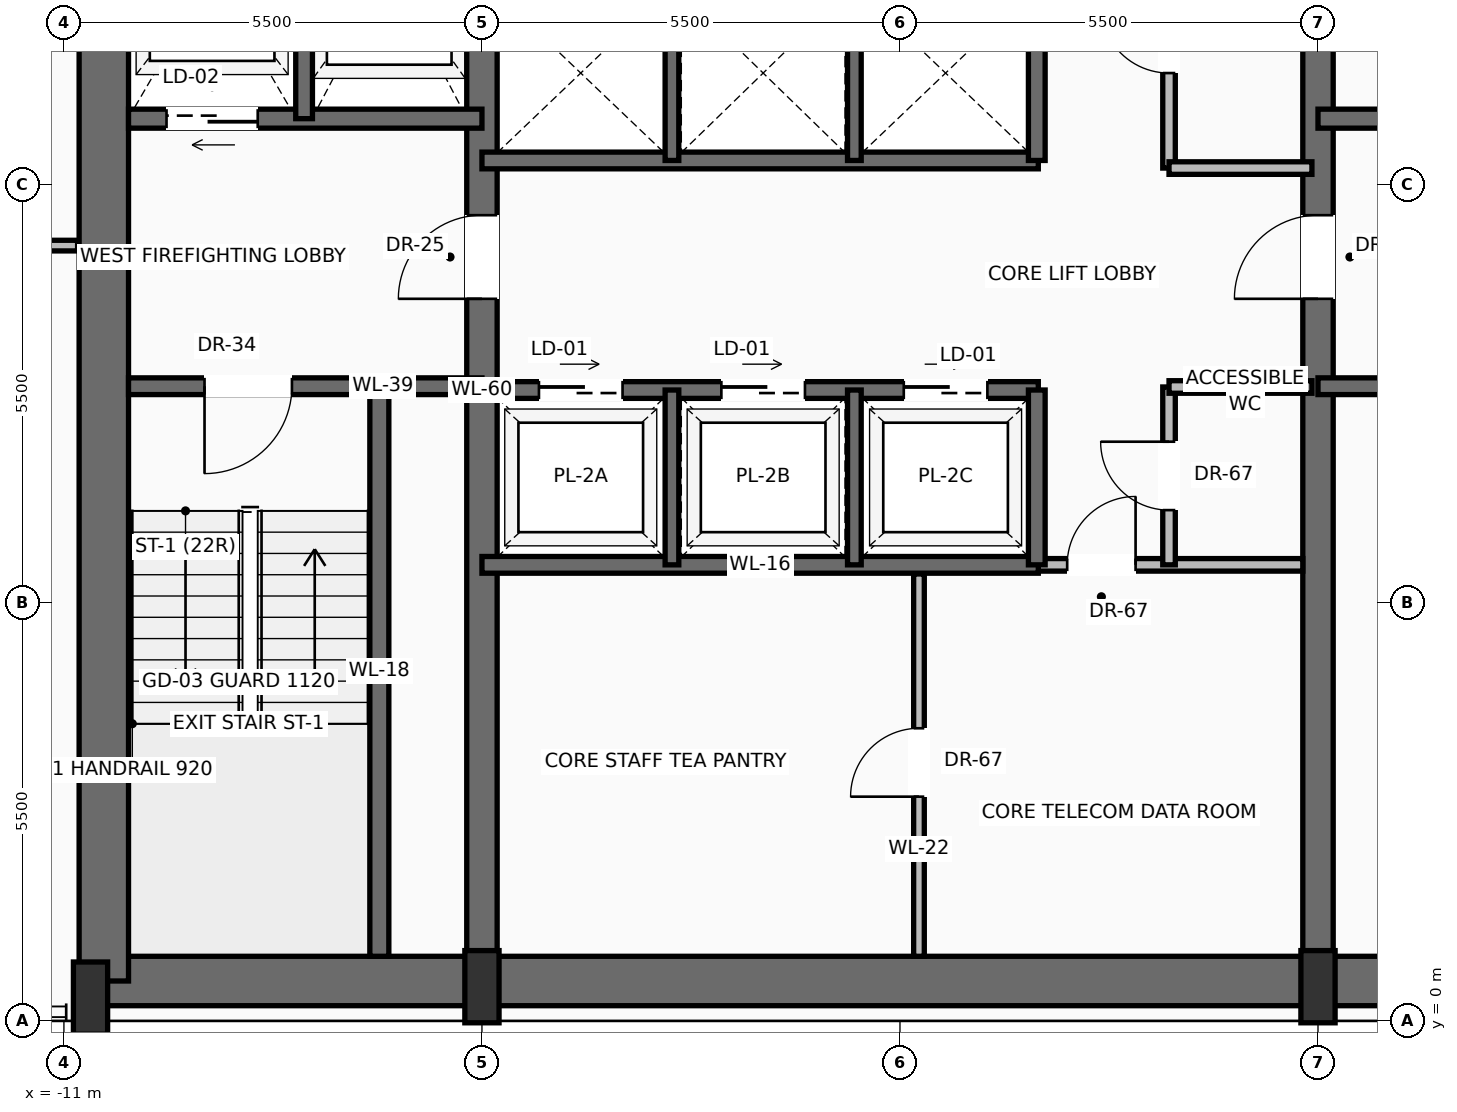
"""IFC4 building model, lengths in metres.
Left out: names, types, materials, properties, quantities, classifications, styles, units other than length and angle.
Written with IfcOpenShell. Run it as: python <this file> out.ifc"""

import sys

from ifc_helpers import new_model, si_unit, direction, frame, frame_2d, origin, origin_2d, place, context, subcontext, project, spatial, rectangle, extrude, source, transform, mapped, element, fill, save


model = new_model("IFC4")
c1 = context("Model", 3, precision=1e-05, world=origin(), true_north=direction((0.0, 1.0)))
c2 = subcontext(c1, "Body", "Model", "MODEL_VIEW")
j1 = project(units=[si_unit("LENGTHUNIT", "METRE"), si_unit("PLANEANGLEUNIT", "RADIAN")], contexts=[c1])
p1 = place(None, origin())
s1 = spatial("IfcSite", under=j1, at=p1, CompositionType="ELEMENT")
p2 = place(p1, origin())
s2 = spatial("IfcBuilding", under=s1, at=p2, CompositionType="ELEMENT")
p3 = place(p2, frame((0.0, 0.0, 200.6)))
s3 = spatial("IfcBuildingStorey", under=s2, at=p3, CompositionType="ELEMENT", Elevation=200.6)
p4 = place(p3, frame((-10.65, 0.525, 0.0), z_axis=(0.0, 0.0, 1.0), x_axis=(1.0, 0.0, 0.0)))
e1 = element("IfcWall", 1, at=p4, inside=s3, PredefinedType="SHEAR", context=c2, shape_type="SweptSolid", body=[
    extrude(rectangle(XDim=21.3, YDim=0.65, at=frame_2d((10.65, 0.0))), origin(), (0.0, 0.0, 1.0), 3.47),
])
p5 = place(p3, frame((-10.475, 0.525, 0.0), z_axis=(0.0, 0.0, 1.0), x_axis=(0.0, 1.0, 0.0)))
e2 = element("IfcWall", 2, at=p5, inside=s3, PredefinedType="SHEAR", context=c2, shape_type="SweptSolid", body=[
    extrude(rectangle(XDim=15.55, YDim=0.65, at=frame_2d((7.775, 0.0))), origin(), (0.0, 0.0, 1.0), 3.47),
])
p6 = place(p3, frame((-5.5, 0.525, 0.0), z_axis=(0.0, 0.0, 1.0), x_axis=(0.0, 1.0, 0.0)))
e3 = element("IfcWall", 3, at=p6, inside=s3, PredefinedType="SHEAR", context=c2, shape_type="SweptSolid", body=[
    extrude(rectangle(XDim=15.55, YDim=0.4, at=frame_2d((7.775, 0.0))), origin(), (0.0, 0.0, 1.0), 3.47),
])
p7 = place(p6, frame((8.975, 0.0, 0.0)))
e4 = element("IfcOpeningElement", 4, at=p7, cuts=e3, PredefinedType="OPENING", context=c2, shape_type="SweptSolid", body=[
    extrude(rectangle(XDim=1.1, YDim=2.2, at=frame_2d((0.55, 1.1))), frame((0.0, 0.21, 0.0), z_axis=(0.0, -1.0, 0.0), x_axis=(1.0, 0.0, 0.0)), (0.0, 0.0, 1.0), 0.42),
])
p8 = place(p3, frame((5.5, 0.525, 0.0), z_axis=(0.0, 0.0, 1.0), x_axis=(0.0, 1.0, 0.0)))
e5 = element("IfcWall", 5, at=p8, inside=s3, PredefinedType="SHEAR", context=c2, shape_type="SweptSolid", body=[
    extrude(rectangle(XDim=15.55, YDim=0.4, at=frame_2d((7.775, 0.0))), origin(), (0.0, 0.0, 1.0), 3.47),
])
p9 = place(p8, frame((8.975, 0.0, 0.0)))
e6 = element("IfcOpeningElement", 6, at=p9, cuts=e5, PredefinedType="OPENING", context=c2, shape_type="SweptSolid", body=[
    extrude(rectangle(XDim=1.1, YDim=2.2, at=frame_2d((0.55, 1.1))), frame((0.0, 0.21, 0.0), z_axis=(0.0, -1.0, 0.0), x_axis=(1.0, 0.0, 0.0)), (0.0, 0.0, 1.0), 0.42),
])
m1 = source(origin(), c2, "Body", "SweptSolid", [
    extrude(rectangle(XDim=0.45, YDim=0.95, at=origin_2d()), origin(), (0.0, 0.0, 1.0), 3.7),
])
for number, where, z_axis, x_axis in (
    (7, (-10.65, 0.3, 0.0), (0.0, 0.0, 1.0), (1.0, 0.0, 0.0)),
    (8, (-5.5, 0.45, 0.0), (0.0, 0.0, 1.0), (1.0, 0.0, 0.0)),
    (9, (5.5, 0.45, 0.0), (0.0, 0.0, 1.0), (1.0, 0.0, 0.0)),
):
    element("IfcColumn", number, at=place(p3, frame(where, z_axis=z_axis, x_axis=x_axis)), inside=s3, PredefinedType="PILASTER", context=c2, shape_type="MappedRepresentation", body=[
        mapped(m1, transform((0.0, 0.0, 0.0), scale=1.0)),
    ])
p10 = place(p3, frame((-6.85, 0.85, 0.0), z_axis=(0.0, 0.0, 1.0), x_axis=(0.0, 1.0, 0.0)))
e10 = element("IfcWall", 10, at=p10, inside=s3, PredefinedType="SOLIDWALL", context=c2, shape_type="SweptSolid", body=[
    extrude(rectangle(XDim=7.5, YDim=0.25, at=frame_2d((3.75, 0.0))), origin(), (0.0, 0.0, 1.0), 3.47),
])
p11 = place(p3, frame((-5.5, 8.35, 0.0), z_axis=(0.0, 0.0, 1.0), x_axis=(-1.0, 0.0, 0.0)))
e11 = element("IfcWall", 11, at=p11, inside=s3, PredefinedType="SOLIDWALL", context=c2, shape_type="SweptSolid", body=[
    extrude(rectangle(XDim=4.65, YDim=0.22, at=frame_2d((2.325, 0.0))), origin(), (0.0, 0.0, 1.0), 3.47),
])
p12 = place(p11, frame((2.5, 0.0, 0.0)))
e12 = element("IfcOpeningElement", 12, at=p12, cuts=e11, PredefinedType="OPENING", context=c2, shape_type="SweptSolid", body=[
    extrude(rectangle(XDim=1.15, YDim=2.2, at=frame_2d((0.575, 1.1))), frame((0.0, 0.12, 0.0), z_axis=(0.0, -1.0, 0.0), x_axis=(1.0, 0.0, 0.0)), (0.0, 0.0, 1.0), 0.24),
])
p13 = place(p3, frame((-5.5, 11.87, 0.0), z_axis=(0.0, 0.0, 1.0), x_axis=(-1.0, 0.0, 0.0)))
e13 = element("IfcWall", 13, at=p13, inside=s3, PredefinedType="SOLIDWALL", context=c2, shape_type="SweptSolid", body=[
    extrude(rectangle(XDim=4.65, YDim=0.25, at=frame_2d((2.325, 0.0))), origin(), (0.0, 0.0, 1.0), 3.47),
])
p14 = place(p13, frame((2.95, 0.0, 0.0)))
e14 = element("IfcOpeningElement", 14, at=p14, cuts=e13, PredefinedType="OPENING", context=c2, shape_type="SweptSolid", body=[
    extrude(rectangle(XDim=1.2, YDim=2.25, at=frame_2d((0.6, 1.125))), frame((0.0, 0.135, 0.0), z_axis=(0.0, -1.0, 0.0), x_axis=(1.0, 0.0, 0.0)), (0.0, 0.0, 1.0), 0.27),
])
p15 = place(p3, frame((-7.84, 11.87, 0.0), z_axis=(0.0, 0.0, 1.0), x_axis=(0.0, 1.0, 0.0)))
e15 = element("IfcWall", 15, at=p15, inside=s3, PredefinedType="SOLIDWALL", context=c2, shape_type="SweptSolid", body=[
    extrude(rectangle(XDim=3.88, YDim=0.22, at=frame_2d((1.94, 0.0))), origin(), (0.0, 0.0, 1.0), 3.47),
])
p16 = place(p3, frame((10.15, 8.35, 0.0), z_axis=(0.0, 0.0, 1.0), x_axis=(-1.0, 0.0, 0.0)))
e16 = element("IfcWall", 16, at=p16, inside=s3, PredefinedType="SOLIDWALL", context=c2, shape_type="SweptSolid", body=[
    extrude(rectangle(XDim=4.65, YDim=0.22, at=frame_2d((2.325, 0.0))), origin(), (0.0, 0.0, 1.0), 3.47),
])
p17 = place(p16, frame((1.0, 0.0, 0.0)))
e17 = element("IfcOpeningElement", 17, at=p17, cuts=e16, PredefinedType="OPENING", context=c2, shape_type="SweptSolid", body=[
    extrude(rectangle(XDim=1.15, YDim=2.2, at=frame_2d((0.575, 1.1))), frame((0.0, 0.12, 0.0), z_axis=(0.0, -1.0, 0.0), x_axis=(1.0, 0.0, 0.0)), (0.0, 0.0, 1.0), 0.24),
])
p18 = place(p3, frame((10.15, 11.87, 0.0), z_axis=(0.0, 0.0, 1.0), x_axis=(-1.0, 0.0, 0.0)))
e18 = element("IfcWall", 18, at=p18, inside=s3, PredefinedType="SOLIDWALL", context=c2, shape_type="SweptSolid", body=[
    extrude(rectangle(XDim=4.65, YDim=0.25, at=frame_2d((2.325, 0.0))), origin(), (0.0, 0.0, 1.0), 3.47),
])
p19 = place(p18, frame((0.5, 0.0, 0.0)))
e19 = element("IfcOpeningElement", 19, at=p19, cuts=e18, PredefinedType="OPENING", context=c2, shape_type="SweptSolid", body=[
    extrude(rectangle(XDim=1.2, YDim=2.25, at=frame_2d((0.6, 1.125))), frame((0.0, 0.135, 0.0), z_axis=(0.0, -1.0, 0.0), x_axis=(1.0, 0.0, 0.0)), (0.0, 0.0, 1.0), 0.27),
])
p20 = place(p3, frame((1.82, 6.0, 0.0), z_axis=(0.0, 0.0, 1.0), x_axis=(1.0, 0.0, 0.0)))
e20 = element("IfcWall", 20, at=p20, inside=s3, PredefinedType="PARTITIONING", context=c2, shape_type="SweptSolid", body=[
    extrude(rectangle(XDim=3.48, YDim=0.165, at=frame_2d((1.74, 0.0))), origin(), (0.0, 0.0, 1.0), 3.462),
])
p21 = place(p20, frame((0.38, 0.0, 0.0)))
e21 = element("IfcOpeningElement", 21, at=p21, cuts=e20, PredefinedType="OPENING", context=c2, shape_type="SweptSolid", body=[
    extrude(rectangle(XDim=0.9, YDim=2.1, at=frame_2d((0.45, 1.05))), frame((0.0, 0.093, 0.0), z_axis=(0.0, -1.0, 0.0), x_axis=(1.0, 0.0, 0.0)), (0.0, 0.0, 1.0), 0.185),
])
p22 = place(p3, frame((0.25, 0.85, 0.0), z_axis=(0.0, 0.0, 1.0), x_axis=(0.0, 1.0, 0.0)))
e22 = element("IfcWall", 22, at=p22, inside=s3, PredefinedType="PARTITIONING", context=c2, shape_type="SweptSolid", body=[
    extrude(rectangle(XDim=5.03, YDim=0.14, at=frame_2d((2.515, 0.0))), origin(), (0.0, 0.0, 1.0), 3.462),
])
p23 = place(p22, frame((2.1, 0.0, 0.0)))
e23 = element("IfcOpeningElement", 23, at=p23, cuts=e22, PredefinedType="OPENING", context=c2, shape_type="SweptSolid", body=[
    extrude(rectangle(XDim=0.9, YDim=2.1, at=frame_2d((0.45, 1.05))), frame((0.0, 0.08, 0.0), z_axis=(0.0, -1.0, 0.0), x_axis=(1.0, 0.0, 0.0)), (0.0, 0.0, 1.0), 0.16),
])
p24 = place(p3, frame((3.54, 6.0, 0.0), z_axis=(0.0, 0.0, 1.0), x_axis=(0.0, 1.0, 0.0)))
e24 = element("IfcWall", 24, at=p24, inside=s3, PredefinedType="PARTITIONING", context=c2, shape_type="SweptSolid", body=[
    extrude(rectangle(XDim=2.34, YDim=0.165, at=frame_2d((1.17, 0.0))), origin(), (0.0, 0.0, 1.0), 3.462),
])
p25 = place(p24, frame((0.72, 0.0, 0.0)))
e25 = element("IfcOpeningElement", 25, at=p25, cuts=e24, PredefinedType="OPENING", context=c2, shape_type="SweptSolid", body=[
    extrude(rectangle(XDim=0.9, YDim=2.1, at=frame_2d((0.45, 1.05))), frame((0.0, 0.093, 0.0), z_axis=(0.0, -1.0, 0.0), x_axis=(1.0, 0.0, 0.0)), (0.0, 0.0, 1.0), 0.185),
])
p26 = place(p3, frame((3.54, 8.34, 0.0), z_axis=(0.0, 0.0, 1.0), x_axis=(1.0, 0.0, 0.0)))
e26 = element("IfcWall", 26, at=p26, inside=s3, PredefinedType="PARTITIONING", context=c2, shape_type="SweptSolid", body=[
    extrude(rectangle(XDim=1.88, YDim=0.165, at=frame_2d((0.94, 0.0))), origin(), (0.0, 0.0, 1.0), 3.462),
])
p27 = place(p3, frame((-5.5, 6.0, 0.0), z_axis=(0.0, 0.0, 1.0), x_axis=(1.0, 0.0, 0.0)))
e27 = element("IfcWall", 27, at=p27, inside=s3, PredefinedType="SOLIDWALL", context=c2, shape_type="SweptSolid", body=[
    extrude(rectangle(XDim=7.32, YDim=0.22, at=frame_2d((3.66, 0.0))), origin(), (0.0, 0.0, 1.0), 3.47),
])
p28 = place(p3, frame((-5.5, 8.3, 0.0), z_axis=(0.0, 0.0, 1.0), x_axis=(1.0, 0.0, 0.0)))
e28 = element("IfcWall", 28, at=p28, inside=s3, PredefinedType="SOLIDWALL", context=c2, shape_type="SweptSolid", body=[
    extrude(rectangle(XDim=7.32, YDim=0.22, at=frame_2d((3.66, 0.0))), origin(), (0.0, 0.0, 1.0), 3.47),
])
p29 = place(p28, frame((0.75, 0.0, 0.0)))
e29 = element("IfcOpeningElement", 29, at=p29, cuts=e28, PredefinedType="OPENING", context=c2, shape_type="SweptSolid", body=[
    extrude(rectangle(XDim=1.1, YDim=2.2, at=frame_2d((0.55, 1.1))), frame((0.0, 0.12, 0.0), z_axis=(0.0, -1.0, 0.0), x_axis=(1.0, 0.0, 0.0)), (0.0, 0.0, 1.0), 0.24),
])
p30 = place(p28, frame((3.15, 0.0, 0.0)))
e30 = element("IfcOpeningElement", 30, at=p30, cuts=e28, PredefinedType="OPENING", context=c2, shape_type="SweptSolid", body=[
    extrude(rectangle(XDim=1.1, YDim=2.2, at=frame_2d((0.55, 1.1))), frame((0.0, 0.12, 0.0), z_axis=(0.0, -1.0, 0.0), x_axis=(1.0, 0.0, 0.0)), (0.0, 0.0, 1.0), 0.24),
])
p31 = place(p28, frame((5.55, 0.0, 0.0)))
e31 = element("IfcOpeningElement", 31, at=p31, cuts=e28, PredefinedType="OPENING", context=c2, shape_type="SweptSolid", body=[
    extrude(rectangle(XDim=1.1, YDim=2.2, at=frame_2d((0.55, 1.1))), frame((0.0, 0.12, 0.0), z_axis=(0.0, -1.0, 0.0), x_axis=(1.0, 0.0, 0.0)), (0.0, 0.0, 1.0), 0.24),
])
p32 = place(p3, frame((1.8, 6.0, 0.0), z_axis=(0.0, 0.0, 1.0), x_axis=(0.0, 1.0, 0.0)))
e32 = element("IfcWall", 32, at=p32, inside=s3, PredefinedType="SOLIDWALL", context=c2, shape_type="SweptSolid", body=[
    extrude(rectangle(XDim=2.3, YDim=0.22, at=frame_2d((1.15, 0.0))), origin(), (0.0, 0.0, 1.0), 3.47),
])
for number, where, z_axis, x_axis in (
    (33, (-3.0, 6.0, 0.0), (0.0, 0.0, 1.0), (0.0, 1.0, 0.0)),
    (34, (-0.6, 6.0, 0.0), (0.0, 0.0, 1.0), (0.0, 1.0, 0.0)),
):
    element("IfcWall", number, at=place(p3, frame(where, z_axis=z_axis, x_axis=x_axis)), inside=s3, PredefinedType="SOLIDWALL", context=c2, shape_type="SweptSolid", body=[
        extrude(rectangle(XDim=2.3, YDim=0.18, at=frame_2d((1.15, 0.0))), origin(), (0.0, 0.0, 1.0), 3.47),
    ])
p33 = place(p3, frame((-5.5, 11.32, 0.0), z_axis=(0.0, 0.0, 1.0), x_axis=(1.0, 0.0, 0.0)))
e35 = element("IfcWall", 35, at=p33, inside=s3, PredefinedType="SOLIDWALL", context=c2, shape_type="SweptSolid", body=[
    extrude(rectangle(XDim=7.32, YDim=0.22, at=frame_2d((3.66, 0.0))), origin(), (0.0, 0.0, 1.0), 3.47),
])
p34 = place(p3, frame((1.8, 11.32, 0.0), z_axis=(0.0, 0.0, 1.0), x_axis=(0.0, 1.0, 0.0)))
e36 = element("IfcWall", 36, at=p34, inside=s3, PredefinedType="SOLIDWALL", context=c2, shape_type="SweptSolid", body=[
    extrude(rectangle(XDim=2.3, YDim=0.22, at=frame_2d((1.15, 0.0))), origin(), (0.0, 0.0, 1.0), 3.47),
])
for number, where, z_axis, x_axis in (
    (37, (-3.0, 11.32, 0.0), (0.0, 0.0, 1.0), (0.0, 1.0, 0.0)),
    (38, (-0.6, 11.32, 0.0), (0.0, 0.0, 1.0), (0.0, 1.0, 0.0)),
):
    element("IfcWall", number, at=place(p3, frame(where, z_axis=z_axis, x_axis=x_axis)), inside=s3, PredefinedType="SOLIDWALL", context=c2, shape_type="SweptSolid", body=[
        extrude(rectangle(XDim=2.3, YDim=0.18, at=frame_2d((1.15, 0.0))), origin(), (0.0, 0.0, 1.0), 3.47),
    ])
p35 = place(p3, frame((3.54, 11.22, 0.0), z_axis=(0.0, 0.0, 1.0), x_axis=(0.0, 1.0, 0.0)))
e39 = element("IfcWall", 39, at=p35, inside=s3, PredefinedType="PARTITIONING", context=c2, shape_type="SweptSolid", body=[
    extrude(rectangle(XDim=4.53, YDim=0.165, at=frame_2d((2.265, 0.0))), origin(), (0.0, 0.0, 1.0), 3.462),
])
p36 = place(p35, frame((1.25, 0.0, 0.0)))
e40 = element("IfcOpeningElement", 40, at=p36, cuts=e39, PredefinedType="OPENING", context=c2, shape_type="SweptSolid", body=[
    extrude(rectangle(XDim=0.9, YDim=2.1, at=frame_2d((0.45, 1.05))), frame((0.0, 0.093, 0.0), z_axis=(0.0, -1.0, 0.0), x_axis=(1.0, 0.0, 0.0)), (0.0, 0.0, 1.0), 0.185),
])
p37 = place(p3, frame((3.54, 11.22, 0.0), z_axis=(0.0, 0.0, 1.0), x_axis=(1.0, 0.0, 0.0)))
e41 = element("IfcWall", 41, at=p37, inside=s3, PredefinedType="PARTITIONING", context=c2, shape_type="SweptSolid", body=[
    extrude(rectangle(XDim=1.88, YDim=0.165, at=frame_2d((0.94, 0.0))), origin(), (0.0, 0.0, 1.0), 3.462),
])
p38 = place(p3, frame((-23.851, 10.2, 0.0), z_axis=(0.0, 0.0, 1.0), x_axis=(1.0, 0.0, 0.0)))
e42 = element("IfcWall", 42, at=p38, inside=s3, PredefinedType="PARTITIONING", context=c2, shape_type="SweptSolid", body=[
    extrude(rectangle(XDim=13.031, YDim=0.14, at=frame_2d((6.516, 0.0))), origin(), (0.0, 0.0, 1.0), 3.462),
])
p39 = place(p38, frame((6.046, 0.0, 0.0)))
e43 = element("IfcOpeningElement", 43, at=p39, cuts=e42, PredefinedType="OPENING", context=c2, shape_type="SweptSolid", body=[
    extrude(rectangle(XDim=0.95, YDim=2.2, at=frame_2d((0.475, 1.1))), frame((0.0, 0.08, 0.0), z_axis=(0.0, -1.0, 0.0), x_axis=(1.0, 0.0, 0.0)), (0.0, 0.0, 1.0), 0.16),
])
m2 = source(origin(), c2, "Body", "SweptSolid", [
    extrude(rectangle(XDim=1.15, YDim=2.2, at=frame_2d((0.575, 1.1))), frame((0.0, 0.025, 0.0), z_axis=(0.0, -1.0, 0.0), x_axis=(1.0, 0.0, 0.0)), (0.0, 0.0, 1.0), 0.05),
])
p40 = place(p12, origin())
e44 = element("IfcDoor", 44, at=p40, inside=s3, OperationType="SINGLE_SWING_RIGHT", PredefinedType="DOOR", context=c2, shape_type="MappedRepresentation", body=[
    mapped(m2, transform((0.0, 0.0, 0.0), scale=1.0)),
])
fill(e12, e44)
m3 = source(origin(), c2, "Body", "SweptSolid", [
    extrude(rectangle(XDim=1.1, YDim=2.2, at=frame_2d((0.55, 1.1))), frame((0.0, 0.025, 0.0), z_axis=(0.0, -1.0, 0.0), x_axis=(1.0, 0.0, 0.0)), (0.0, 0.0, 1.0), 0.05),
])
p41 = place(p7, origin())
e45 = element("IfcDoor", 45, at=p41, inside=s3, OperationType="SINGLE_SWING_LEFT", PredefinedType="DOOR", context=c2, shape_type="MappedRepresentation", body=[
    mapped(m3, transform((0.0, 0.0, 0.0), scale=1.0)),
])
fill(e4, e45)
m4 = source(origin(), c2, "Body", "SweptSolid", [
    extrude(rectangle(XDim=1.2, YDim=2.25, at=frame_2d((0.6, 1.125))), frame((0.0, 0.025, 0.0), z_axis=(0.0, -1.0, 0.0), x_axis=(1.0, 0.0, 0.0)), (0.0, 0.0, 1.0), 0.05),
])
p42 = place(p14, origin())
e46 = element("IfcDoor", 46, at=p42, inside=s3, OperationType="SLIDING_TO_LEFT", PredefinedType="DOOR", context=c2, shape_type="MappedRepresentation", body=[
    mapped(m4, transform((0.0, 0.0, 0.0), scale=1.0)),
])
fill(e14, e46)
p43 = place(p9, origin())
e47 = element("IfcDoor", 47, at=p43, inside=s3, OperationType="SINGLE_SWING_LEFT", PredefinedType="DOOR", context=c2, shape_type="MappedRepresentation", body=[
    mapped(m3, transform((0.0, 0.0, 0.0), scale=1.0)),
])
fill(e6, e47)
m5 = source(origin(), c2, "Body", "SweptSolid", [
    extrude(rectangle(XDim=0.9, YDim=2.1, at=frame_2d((0.45, 1.05))), frame((0.0, 0.025, 0.0), z_axis=(0.0, -1.0, 0.0), x_axis=(1.0, 0.0, 0.0)), (0.0, 0.0, 1.0), 0.05),
])
p44 = place(p21, origin())
e48 = element("IfcDoor", 48, at=p44, inside=s3, OperationType="SINGLE_SWING_RIGHT", PredefinedType="DOOR", context=c2, shape_type="MappedRepresentation", body=[
    mapped(m5, transform((0.0, 0.0, 0.0), scale=1.0)),
])
fill(e21, e48)
p45 = place(p23, origin())
e49 = element("IfcDoor", 49, at=p45, inside=s3, OperationType="SINGLE_SWING_LEFT", PredefinedType="DOOR", context=c2, shape_type="MappedRepresentation", body=[
    mapped(m5, transform((0.0, 0.0, 0.0), scale=1.0)),
])
fill(e23, e49)
p46 = place(p25, origin())
e50 = element("IfcDoor", 50, at=p46, inside=s3, OperationType="SINGLE_SWING_RIGHT", PredefinedType="DOOR", context=c2, shape_type="MappedRepresentation", body=[
    mapped(m5, transform((0.0, 0.0, 0.0), scale=1.0)),
])
fill(e25, e50)
m6 = source(origin(), c2, "Body", "SweptSolid", [
    extrude(rectangle(XDim=1.1, YDim=2.2, at=frame_2d((0.55, 1.1))), frame((0.0, 0.025, 0.0), z_axis=(0.0, -1.0, 0.0), x_axis=(1.0, 0.0, 0.0)), (0.0, 0.0, 1.0), 0.05),
])
p47 = place(p29, origin())
e51 = element("IfcDoor", 51, at=p47, inside=s3, OperationType="SLIDING_TO_LEFT", PredefinedType="DOOR", context=c2, shape_type="MappedRepresentation", body=[
    mapped(m6, transform((0.0, 0.0, 0.0), scale=1.0)),
])
fill(e29, e51)
p48 = place(p30, origin())
e52 = element("IfcDoor", 52, at=p48, inside=s3, OperationType="SLIDING_TO_LEFT", PredefinedType="DOOR", context=c2, shape_type="MappedRepresentation", body=[
    mapped(m6, transform((0.0, 0.0, 0.0), scale=1.0)),
])
fill(e30, e52)
p49 = place(p31, origin())
e53 = element("IfcDoor", 53, at=p49, inside=s3, OperationType="SLIDING_TO_LEFT", PredefinedType="DOOR", context=c2, shape_type="MappedRepresentation", body=[
    mapped(m6, transform((0.0, 0.0, 0.0), scale=1.0)),
])
fill(e31, e53)
p50 = place(p36, origin())
e54 = element("IfcDoor", 54, at=p50, inside=s3, OperationType="SINGLE_SWING_RIGHT", PredefinedType="DOOR", context=c2, shape_type="MappedRepresentation", body=[
    mapped(m5, transform((0.0, 0.0, 0.0), scale=1.0)),
])
fill(e40, e54)
save(model, sys.argv[1])
